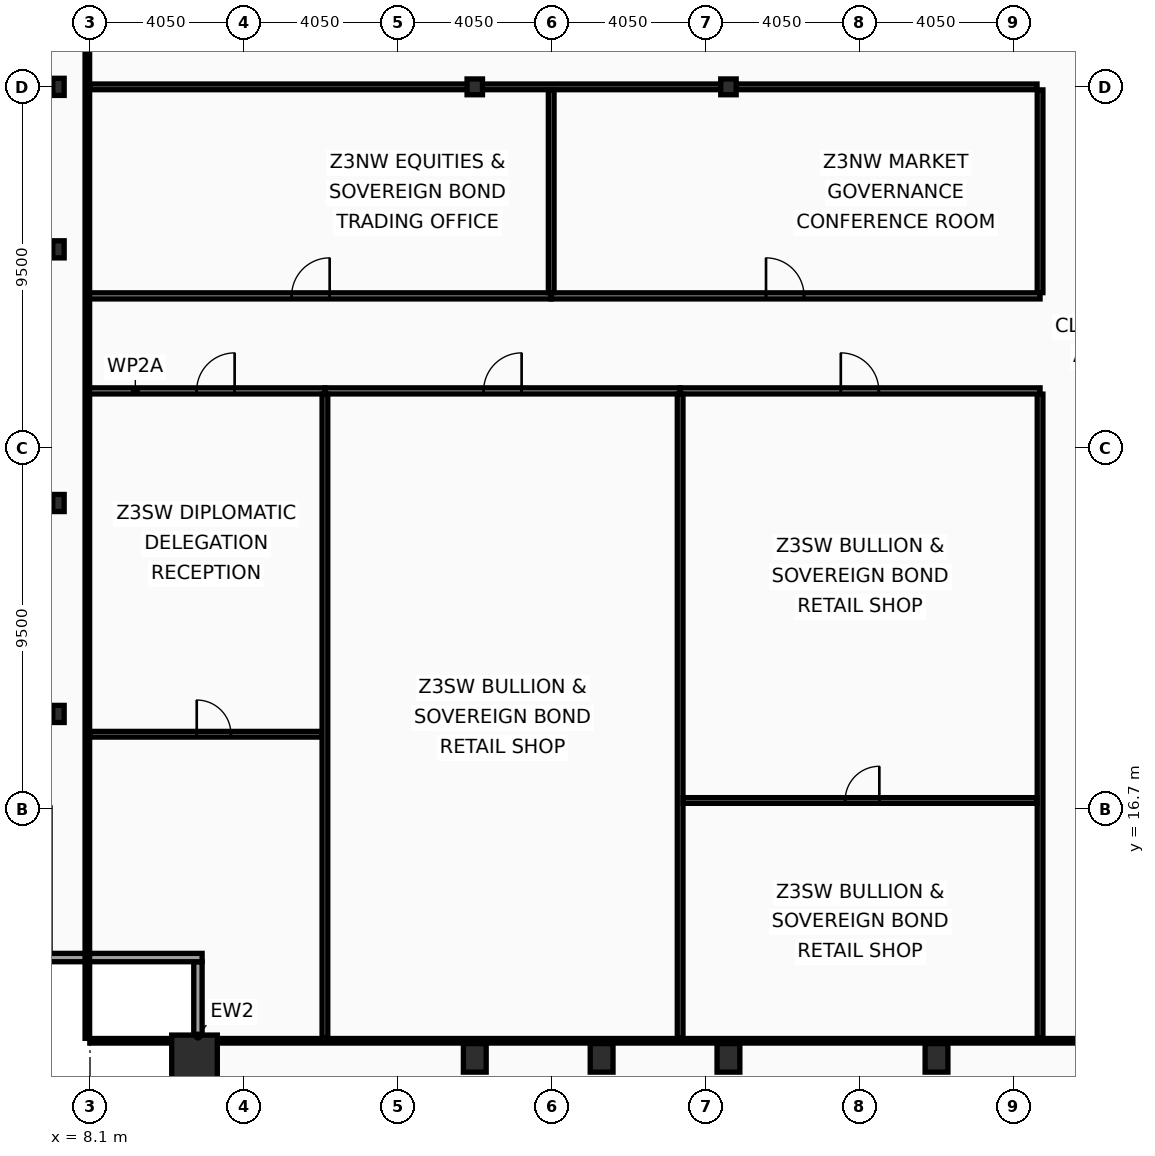
"""IFC4 building model, lengths in metres.
Left out: names, types, materials, properties, quantities, classifications, styles, units other than length and angle.
Written with IfcOpenShell. Run it as: python <this file> out.ifc"""

import sys

from ifc_helpers import new_model, si_unit, direction, frame, frame_2d, origin, origin_2d, place, context, subcontext, project, spatial, rectangle, hollow_rectangle, i_section, extrude, element, fill, save


model = new_model("IFC4")
c1 = context("Model", 3, precision=1e-05, world=origin(), true_north=direction((0.0, 1.0)))
c2 = subcontext(c1, "Body", "Model", "MODEL_VIEW")
j1 = project(units=[si_unit("LENGTHUNIT", "METRE"), si_unit("PLANEANGLEUNIT", "RADIAN")], contexts=[c1])
p1 = place(None, origin())
s1 = spatial("IfcSite", under=j1, at=p1, CompositionType="ELEMENT")
p2 = place(p1, origin())
s2 = spatial("IfcBuilding", under=s1, at=p2, CompositionType="ELEMENT")
p3 = place(p2, frame((0.0, 0.0, 206.6)))
s3 = spatial("IfcBuildingStorey", under=s2, at=p3, CompositionType="ELEMENT", Elevation=206.6)
p4 = place(p3, frame((10.85, 10.15, 0.0), z_axis=(0.0, 0.0, 1.0), x_axis=(1.0, 0.0, 0.0)))
e1 = element("IfcColumn", 1, at=p4, inside=s3, PredefinedType="COLUMN", context=c2, shape_type="SweptSolid", body=[
    extrude(hollow_rectangle(XDim=1.2, YDim=1.2, WallThickness=0.06, at=origin_2d()), origin(), (0.0, 0.0, 1.0), 3.6),
])
for number, where, z_axis, x_axis in (
    (2, (18.225, 10.15, 0.0), (0.0, 0.0, 1.0), (1.0, 0.0, 0.0)),
    (3, (21.562, 10.15, 0.0), (0.0, 0.0, 1.0), (1.0, 0.0, 0.0)),
    (4, (24.9, 10.15, 0.0), (0.0, 0.0, 1.0), (1.0, 0.0, 0.0)),
    (5, (30.375, 10.15, 0.0), (0.0, 0.0, 1.0), (1.0, 0.0, 0.0)),
):
    element("IfcColumn", number, at=place(p3, frame(where, z_axis=z_axis, x_axis=x_axis)), inside=s3, PredefinedType="COLUMN", context=c2, shape_type="SweptSolid", body=[
        extrude(hollow_rectangle(XDim=0.6, YDim=0.75, WallThickness=0.045, at=origin_2d()), origin(), (0.0, 0.0, 1.0), 3.6),
    ])
for number, where, z_axis, x_axis in (
    (6, (7.27, 19.2, 0.0), (0.0, 0.0, 1.0), (1.0, 0.0, 0.0)),
    (7, (7.27, 24.75, 0.0), (0.0, 0.0, 1.0), (1.0, 0.0, 0.0)),
    (8, (7.27, 31.425, 0.0), (0.0, 0.0, 1.0), (1.0, 0.0, 0.0)),
    (9, (7.27, 35.7, 0.0), (0.0, 0.0, 1.0), (1.0, 0.0, 0.0)),
):
    element("IfcColumn", number, at=place(p3, frame(where, z_axis=z_axis, x_axis=x_axis)), inside=s3, PredefinedType="COLUMN", context=c2, shape_type="SweptSolid", body=[
        extrude(i_section(OverallWidth=0.3, OverallDepth=0.45, WebThickness=0.014, FlangeThickness=0.026, at=origin_2d()), origin(), (0.0, 0.0, 1.0), 3.6),
    ])
for number, where, z_axis, x_axis in (
    (10, (18.225, 35.7, 0.0), (0.0, 0.0, 1.0), (1.0, 0.0, 0.0)),
    (11, (24.9, 35.7, 0.0), (0.0, 0.0, 1.0), (1.0, 0.0, 0.0)),
):
    element("IfcColumn", number, at=place(p3, frame(where, z_axis=z_axis, x_axis=x_axis)), inside=s3, PredefinedType="COLUMN", context=c2, shape_type="SweptSolid", body=[
        extrude(i_section(OverallWidth=0.406, OverallDepth=0.416, WebThickness=0.03, FlangeThickness=0.048, at=origin_2d()), origin(), (0.0, 0.0, 1.0), 3.6),
    ])
p5 = place(p3, frame((10.94, 8.77, 0.0), z_axis=(0.0, 0.0, 1.0), x_axis=(0.0, 1.0, 0.0)))
e12 = element("IfcWall", 12, at=p5, inside=s3, PredefinedType="SOLIDWALL", context=c2, shape_type="SweptSolid", body=[
    extrude(rectangle(XDim=3.91, YDim=0.22, at=frame_2d((1.955, 0.0))), origin(), (0.0, 0.0, 1.0), 2.83),
])
p6 = place(p3, frame((11.05, 12.79, 0.0), z_axis=(0.0, 0.0, 1.0), x_axis=(-1.0, 0.0, 0.0)))
e13 = element("IfcWall", 13, at=p6, inside=s3, PredefinedType="SOLIDWALL", context=c2, shape_type="SweptSolid", body=[
    extrude(rectangle(XDim=4.22, YDim=0.22, at=frame_2d((2.11, 0.0))), origin(), (0.0, 0.0, 1.0), 2.83),
])
p7 = place(p3, frame((33.1, 10.665, 0.0), z_axis=(0.0, 0.0, 1.0), x_axis=(0.0, 1.0, 0.0)))
e14 = element("IfcWall", 14, at=p7, inside=s3, PredefinedType="PARTITIONING", context=c2, shape_type="SweptSolid", body=[
    extrude(rectangle(XDim=16.95, YDim=0.15, at=frame_2d((8.475, 0.0))), origin(), (0.0, 0.0, 1.0), 2.98),
])
p8 = place(p3, frame((33.1, 30.285, 0.0), z_axis=(0.0, 0.0, 1.0), x_axis=(0.0, 1.0, 0.0)))
e15 = element("IfcWall", 15, at=p8, inside=s3, PredefinedType="PARTITIONING", context=c2, shape_type="SweptSolid", body=[
    extrude(rectangle(XDim=5.335, YDim=0.15, at=frame_2d((2.667, 0.0))), origin(), (0.0, 0.0, 1.0), 2.98),
])
p9 = place(p3, frame((8.095, 35.7, 0.0), z_axis=(0.0, 0.0, 1.0), x_axis=(1.0, 0.0, 0.0)))
e16 = element("IfcWall", 16, at=p9, inside=s3, PredefinedType="PARTITIONING", context=c2, shape_type="SweptSolid", body=[
    extrude(rectangle(XDim=24.925, YDim=0.15, at=frame_2d((12.462, 0.0))), origin(), (0.0, 0.0, 1.0), 2.73),
])
p10 = place(p3, frame((8.03, 27.7, 0.0), z_axis=(0.0, 0.0, 1.0), x_axis=(1.0, 0.0, 0.0)))
e17 = element("IfcWall", 17, at=p10, inside=s3, PredefinedType="PARTITIONING", context=c2, shape_type="SweptSolid", body=[
    extrude(rectangle(XDim=6.252, YDim=0.16, at=frame_2d((3.126, 0.0))), origin(), (0.0, 0.0, 1.0), 3.44),
])
p11 = place(p10, frame((2.876, 0.0, 0.0)))
e18 = element("IfcOpeningElement", 18, at=p11, cuts=e17, PredefinedType="OPENING", context=c2, shape_type="SweptSolid", body=[
    extrude(rectangle(XDim=1.0, YDim=2.05, at=frame_2d((0.5, 1.025))), frame((0.0, 0.09, 0.0), z_axis=(0.0, -1.0, 0.0), x_axis=(1.0, 0.0, 0.0)), (0.0, 0.0, 1.0), 0.18),
])
p12 = place(p3, frame((8.095, 18.666, 0.0), z_axis=(0.0, 0.0, 1.0), x_axis=(1.0, 0.0, 0.0)))
e19 = element("IfcWall", 19, at=p12, inside=s3, PredefinedType="PARTITIONING", context=c2, shape_type="SweptSolid", body=[
    extrude(rectangle(XDim=6.107, YDim=0.15, at=frame_2d((3.053, 0.0))), origin(), (0.0, 0.0, 1.0), 2.73),
])
p13 = place(p12, frame((2.813, 0.0, 0.0)))
e20 = element("IfcOpeningElement", 20, at=p13, cuts=e19, PredefinedType="OPENING", context=c2, shape_type="SweptSolid", body=[
    extrude(rectangle(XDim=0.9, YDim=2.05, at=frame_2d((0.45, 1.025))), frame((0.0, 0.085, 0.0), z_axis=(0.0, -1.0, 0.0), x_axis=(1.0, 0.0, 0.0)), (0.0, 0.0, 1.0), 0.17),
])
p14 = place(p3, frame((14.282, 27.7, 0.0), z_axis=(0.0, 0.0, 1.0), x_axis=(1.0, 0.0, 0.0)))
e21 = element("IfcWall", 21, at=p14, inside=s3, PredefinedType="PARTITIONING", context=c2, shape_type="SweptSolid", body=[
    extrude(rectangle(XDim=9.347, YDim=0.16, at=frame_2d((4.673, 0.0))), origin(), (0.0, 0.0, 1.0), 2.73),
])
p15 = place(p14, frame((4.176, 0.0, 0.0)))
e22 = element("IfcOpeningElement", 22, at=p15, cuts=e21, PredefinedType="OPENING", context=c2, shape_type="SweptSolid", body=[
    extrude(rectangle(XDim=1.0, YDim=2.05, at=frame_2d((0.5, 1.025))), frame((0.0, 0.09, 0.0), z_axis=(0.0, -1.0, 0.0), x_axis=(1.0, 0.0, 0.0)), (0.0, 0.0, 1.0), 0.18),
])
p16 = place(p3, frame((14.282, 10.665, 0.0), z_axis=(0.0, 0.0, 1.0), x_axis=(0.0, 1.0, 0.0)))
e23 = element("IfcWall", 23, at=p16, inside=s3, PredefinedType="PARTITIONING", context=c2, shape_type="SweptSolid", body=[
    extrude(rectangle(XDim=16.95, YDim=0.15, at=frame_2d((8.475, 0.0))), origin(), (0.0, 0.0, 1.0), 2.73),
])
p17 = place(p3, frame((23.629, 27.7, 0.0), z_axis=(0.0, 0.0, 1.0), x_axis=(1.0, 0.0, 0.0)))
e24 = element("IfcWall", 24, at=p17, inside=s3, PredefinedType="PARTITIONING", context=c2, shape_type="SweptSolid", body=[
    extrude(rectangle(XDim=9.471, YDim=0.16, at=frame_2d((4.736, 0.0))), origin(), (0.0, 0.0, 1.0), 2.73),
])
p18 = place(p17, frame((4.228, 0.0, 0.0)))
e25 = element("IfcOpeningElement", 25, at=p18, cuts=e24, PredefinedType="OPENING", context=c2, shape_type="SweptSolid", body=[
    extrude(rectangle(XDim=1.0, YDim=2.05, at=frame_2d((0.5, 1.025))), frame((0.0, 0.09, 0.0), z_axis=(0.0, -1.0, 0.0), x_axis=(1.0, 0.0, 0.0)), (0.0, 0.0, 1.0), 0.18),
])
p19 = place(p3, frame((23.629, 10.665, 0.0), z_axis=(0.0, 0.0, 1.0), x_axis=(0.0, 1.0, 0.0)))
e26 = element("IfcWall", 26, at=p19, inside=s3, PredefinedType="PARTITIONING", context=c2, shape_type="SweptSolid", body=[
    extrude(rectangle(XDim=16.95, YDim=0.15, at=frame_2d((8.475, 0.0))), origin(), (0.0, 0.0, 1.0), 2.98),
])
p20 = place(p3, frame((23.708, 16.923, 0.0), z_axis=(0.0, 0.0, 1.0), x_axis=(1.0, 0.0, 0.0)))
e27 = element("IfcWall", 27, at=p20, inside=s3, PredefinedType="PARTITIONING", context=c2, shape_type="SweptSolid", body=[
    extrude(rectangle(XDim=9.312, YDim=0.15, at=frame_2d((4.656, 0.0))), origin(), (0.0, 0.0, 1.0), 2.73),
])
p21 = place(p20, frame((4.262, 0.0, 0.0)))
e28 = element("IfcOpeningElement", 28, at=p21, cuts=e27, PredefinedType="OPENING", context=c2, shape_type="SweptSolid", body=[
    extrude(rectangle(XDim=0.9, YDim=2.05, at=frame_2d((0.45, 1.025))), frame((0.0, 0.085, 0.0), z_axis=(0.0, -1.0, 0.0), x_axis=(1.0, 0.0, 0.0)), (0.0, 0.0, 1.0), 0.17),
])
p22 = place(p3, frame((8.03, 30.2, 0.0), z_axis=(0.0, 0.0, 1.0), x_axis=(1.0, 0.0, 0.0)))
e29 = element("IfcWall", 29, at=p22, inside=s3, PredefinedType="PARTITIONING", context=c2, shape_type="SweptSolid", body=[
    extrude(rectangle(XDim=12.206, YDim=0.16, at=frame_2d((6.103, 0.0))), origin(), (0.0, 0.0, 1.0), 2.73),
])
p23 = place(p22, frame((5.376, 0.0, 0.0)))
e30 = element("IfcOpeningElement", 30, at=p23, cuts=e29, PredefinedType="OPENING", context=c2, shape_type="SweptSolid", body=[
    extrude(rectangle(XDim=1.0, YDim=2.05, at=frame_2d((0.5, 1.025))), frame((0.0, 0.09, 0.0), z_axis=(0.0, -1.0, 0.0), x_axis=(1.0, 0.0, 0.0)), (0.0, 0.0, 1.0), 0.18),
])
p24 = place(p3, frame((20.236, 30.2, 0.0), z_axis=(0.0, 0.0, 1.0), x_axis=(1.0, 0.0, 0.0)))
e31 = element("IfcWall", 31, at=p24, inside=s3, PredefinedType="PARTITIONING", context=c2, shape_type="SweptSolid", body=[
    extrude(rectangle(XDim=12.864, YDim=0.16, at=frame_2d((6.432, 0.0))), origin(), (0.0, 0.0, 1.0), 2.73),
])
p25 = place(p24, frame((5.653, 0.0, 0.0)))
e32 = element("IfcOpeningElement", 32, at=p25, cuts=e31, PredefinedType="OPENING", context=c2, shape_type="SweptSolid", body=[
    extrude(rectangle(XDim=1.0, YDim=2.05, at=frame_2d((0.5, 1.025))), frame((0.0, 0.09, 0.0), z_axis=(0.0, -1.0, 0.0), x_axis=(1.0, 0.0, 0.0)), (0.0, 0.0, 1.0), 0.18),
])
p26 = place(p3, frame((20.236, 30.285, 0.0), z_axis=(0.0, 0.0, 1.0), x_axis=(0.0, 1.0, 0.0)))
e33 = element("IfcWall", 33, at=p26, inside=s3, PredefinedType="PARTITIONING", context=c2, shape_type="SweptSolid", body=[
    extrude(rectangle(XDim=5.335, YDim=0.15, at=frame_2d((2.667, 0.0))), origin(), (0.0, 0.0, 1.0), 2.98),
])
p27 = place(p3, frame((8.03, 10.665, 0.0), z_axis=(0.0, 0.0, 1.0), x_axis=(0.0, 1.0, 0.0)))
e34 = element("IfcWall", 34, at=p27, inside=s3, PredefinedType="PARTITIONING", context=c2, shape_type="SweptSolid", body=[
    extrude(rectangle(XDim=42.11, YDim=0.12, at=frame_2d((21.055, 0.0))), origin(), (0.0, 0.0, 1.0), 2.73),
])
p28 = place(p3, frame((8.095, 10.6, 0.0), z_axis=(0.0, 0.0, 1.0), x_axis=(1.0, 0.0, 0.0)))
e35 = element("IfcWall", 35, at=p28, inside=s3, PredefinedType="PARTITIONING", context=c2, shape_type="SweptSolid", body=[
    extrude(rectangle(XDim=56.71, YDim=0.12, at=frame_2d((28.355, 0.0))), origin(), (0.0, 0.0, 1.0), 2.73),
])
p29 = place(p11, origin())
e36 = element("IfcDoor", 36, at=p29, inside=s3, OperationType="SINGLE_SWING_RIGHT", PredefinedType="DOOR", context=c2, shape_type="SweptSolid", body=[
    extrude(rectangle(XDim=1.0, YDim=2.05, at=frame_2d((0.5, 1.025))), frame((0.0, 0.025, 0.0), z_axis=(0.0, -1.0, 0.0), x_axis=(1.0, 0.0, 0.0)), (0.0, 0.0, 1.0), 0.05),
])
fill(e18, e36)
p30 = place(p13, origin())
e37 = element("IfcDoor", 37, at=p30, inside=s3, OperationType="SINGLE_SWING_LEFT", PredefinedType="DOOR", context=c2, shape_type="SweptSolid", body=[
    extrude(rectangle(XDim=0.9, YDim=2.05, at=frame_2d((0.45, 1.025))), frame((0.0, 0.025, 0.0), z_axis=(0.0, -1.0, 0.0), x_axis=(1.0, 0.0, 0.0)), (0.0, 0.0, 1.0), 0.05),
])
fill(e20, e37)
p31 = place(p15, origin())
e38 = element("IfcDoor", 38, at=p31, inside=s3, OperationType="SINGLE_SWING_RIGHT", PredefinedType="DOOR", context=c2, shape_type="SweptSolid", body=[
    extrude(rectangle(XDim=1.0, YDim=2.05, at=frame_2d((0.5, 1.025))), frame((0.0, 0.025, 0.0), z_axis=(0.0, -1.0, 0.0), x_axis=(1.0, 0.0, 0.0)), (0.0, 0.0, 1.0), 0.05),
])
fill(e22, e38)
p32 = place(p18, origin())
e39 = element("IfcDoor", 39, at=p32, inside=s3, OperationType="SINGLE_SWING_LEFT", PredefinedType="DOOR", context=c2, shape_type="SweptSolid", body=[
    extrude(rectangle(XDim=1.0, YDim=2.05, at=frame_2d((0.5, 1.025))), frame((0.0, 0.025, 0.0), z_axis=(0.0, -1.0, 0.0), x_axis=(1.0, 0.0, 0.0)), (0.0, 0.0, 1.0), 0.05),
])
fill(e25, e39)
p33 = place(p21, origin())
e40 = element("IfcDoor", 40, at=p33, inside=s3, OperationType="SINGLE_SWING_RIGHT", PredefinedType="DOOR", context=c2, shape_type="SweptSolid", body=[
    extrude(rectangle(XDim=0.9, YDim=2.05, at=frame_2d((0.45, 1.025))), frame((0.0, 0.025, 0.0), z_axis=(0.0, -1.0, 0.0), x_axis=(1.0, 0.0, 0.0)), (0.0, 0.0, 1.0), 0.05),
])
fill(e28, e40)
p34 = place(p23, origin())
e41 = element("IfcDoor", 41, at=p34, inside=s3, OperationType="SINGLE_SWING_RIGHT", PredefinedType="DOOR", context=c2, shape_type="SweptSolid", body=[
    extrude(rectangle(XDim=1.0, YDim=2.05, at=frame_2d((0.5, 1.025))), frame((0.0, 0.025, 0.0), z_axis=(0.0, -1.0, 0.0), x_axis=(1.0, 0.0, 0.0)), (0.0, 0.0, 1.0), 0.05),
])
fill(e30, e41)
p35 = place(p25, origin())
e42 = element("IfcDoor", 42, at=p35, inside=s3, OperationType="SINGLE_SWING_LEFT", PredefinedType="DOOR", context=c2, shape_type="SweptSolid", body=[
    extrude(rectangle(XDim=1.0, YDim=2.05, at=frame_2d((0.5, 1.025))), frame((0.0, 0.025, 0.0), z_axis=(0.0, -1.0, 0.0), x_axis=(1.0, 0.0, 0.0)), (0.0, 0.0, 1.0), 0.05),
])
fill(e32, e42)
save(model, sys.argv[1])
